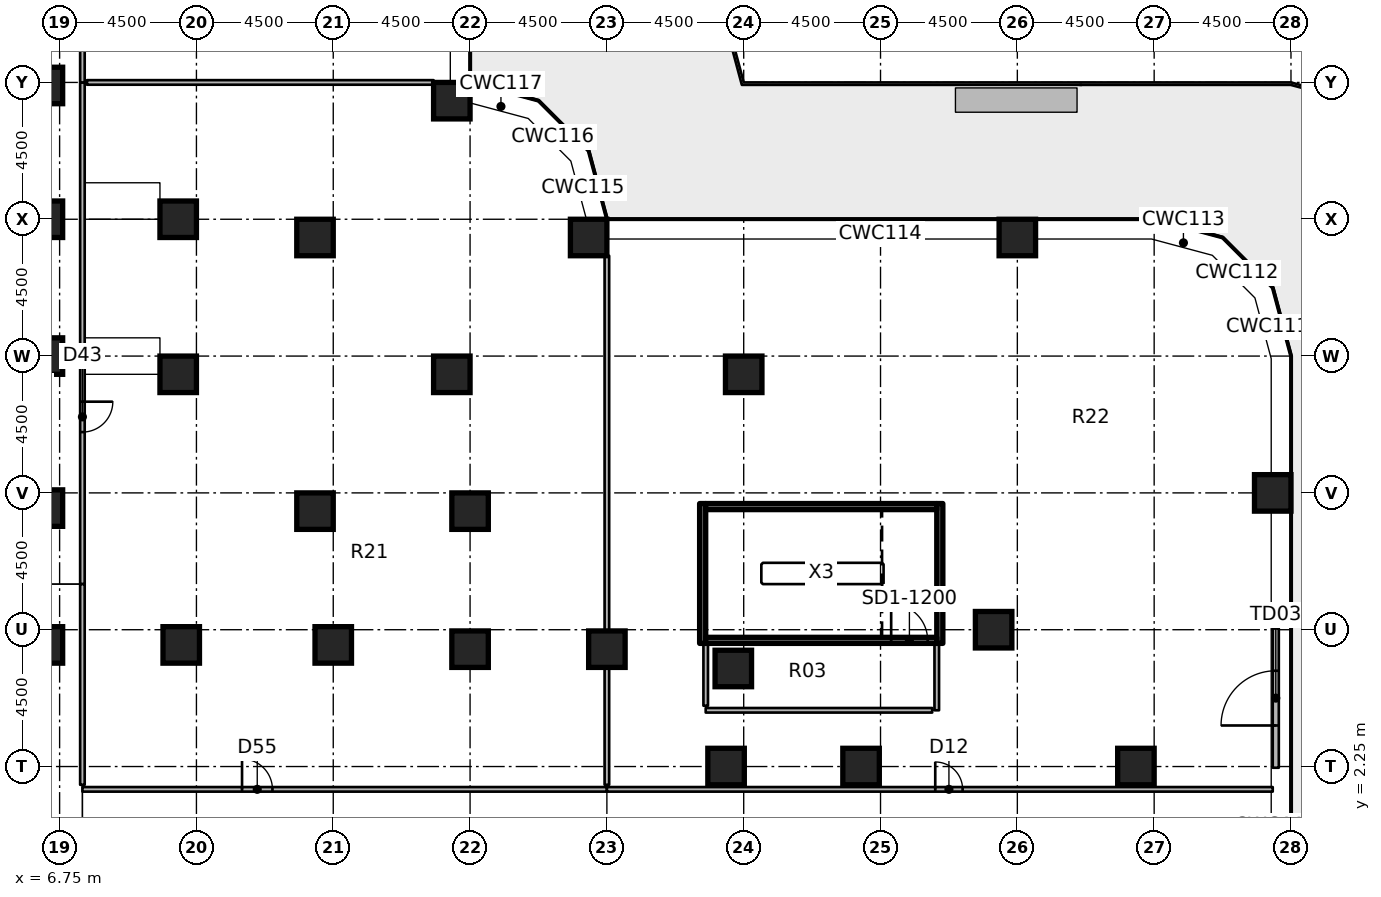
"""IFC4 building model, lengths in metres.
Left out: names, types, materials, properties, quantities, classifications, styles, units other than length and angle.
Written with IfcOpenShell. Run it as: python <this file> out.ifc"""

import sys

from ifc_helpers import new_model, si_unit, direction, frame, frame_2d, origin, origin_2d, place, context, subcontext, project, spatial, rectangle, extrude, element, fill, save


model = new_model("IFC4")
c1 = context("Model", 3, precision=1e-05, world=origin(), true_north=direction((0.0, 1.0)))
c2 = subcontext(c1, "Body", "Model", "MODEL_VIEW")
j1 = project(units=[si_unit("LENGTHUNIT", "METRE"), si_unit("PLANEANGLEUNIT", "RADIAN")], contexts=[c1])
p1 = place(None, origin())
s1 = spatial("IfcSite", under=j1, at=p1, CompositionType="ELEMENT")
p2 = place(p1, origin())
s2 = spatial("IfcBuilding", under=s1, at=p2, CompositionType="ELEMENT")
p3 = place(p2, frame((0.0, 0.0, 12.0)))
s3 = spatial("IfcBuildingStorey", under=s2, at=p3, CompositionType="ELEMENT", Elevation=12.0)
for number, where, z_axis, x_axis in (
    (1, (6.25, 6.25, 0.0), (0.0, 0.0, 1.0), (1.0, 0.0, 0.0)),
    (2, (6.25, 10.75, 0.0), (0.0, 0.0, 1.0), (1.0, 0.0, 0.0)),
    (3, (6.25, 15.75, 0.0), (0.0, 0.0, 1.0), (1.0, 0.0, 0.0)),
    (4, (6.25, 20.25, 0.0), (0.0, 0.0, 1.0), (1.0, 0.0, 0.0)),
    (5, (6.25, 24.65, 0.0), (0.0, 0.0, 1.0), (1.0, 0.0, 0.0)),
    (6, (10.75, 6.25, 0.0), (0.0, 0.0, 1.0), (1.0, 0.0, 0.0)),
    (7, (10.65, 15.15, 0.0), (0.0, 0.0, 1.0), (1.0, 0.0, 0.0)),
    (8, (10.65, 20.25, 0.0), (0.0, 0.0, 1.0), (1.0, 0.0, 0.0)),
    (9, (15.75, 6.25, 0.0), (0.0, 0.0, 1.0), (1.0, 0.0, 0.0)),
    (10, (15.15, 10.65, 0.0), (0.0, 0.0, 1.0), (1.0, 0.0, 0.0)),
    (11, (15.15, 19.65, 0.0), (0.0, 0.0, 1.0), (1.0, 0.0, 0.0)),
    (12, (20.25, 6.11, 0.0), (0.0, 0.0, 1.0), (1.0, 0.0, 0.0)),
    (13, (20.25, 10.65, 0.0), (0.0, 0.0, 1.0), (1.0, 0.0, 0.0)),
    (14, (19.65, 15.15, 0.0), (0.0, 0.0, 1.0), (1.0, 0.0, 0.0)),
    (15, (19.65, 24.15, 0.0), (0.0, 0.0, 1.0), (1.0, 0.0, 0.0)),
    (16, (24.75, 6.11, 0.0), (0.0, 0.0, 1.0), (1.0, 0.0, 0.0)),
    (17, (24.15, 19.65, 0.0), (0.0, 0.0, 1.0), (1.0, 0.0, 0.0)),
    (18, (28.67, 2.25, 0.0), (0.0, 0.0, 1.0), (1.0, 0.0, 0.0)),
    (19, (28.908, 5.475, 0.0), (0.0, 0.0, 1.0), (1.0, 0.0, 0.0)),
    (20, (29.25, 15.15, 0.0), (0.0, 0.0, 1.0), (1.0, 0.0, 0.0)),
    (21, (33.11, 2.25, 0.0), (0.0, 0.0, 1.0), (1.0, 0.0, 0.0)),
    (22, (37.47, 6.75, 0.0), (0.0, 0.0, 1.0), (1.0, 0.0, 0.0)),
    (23, (38.25, 19.65, 0.0), (0.0, 0.0, 1.0), (1.0, 0.0, 0.0)),
    (24, (42.15, 2.25, 0.0), (0.0, 0.0, 1.0), (1.0, 0.0, 0.0)),
    (25, (46.65, 11.25, 0.0), (0.0, 0.0, 1.0), (1.0, 0.0, 0.0)),
):
    element("IfcColumn", number, at=place(p3, frame(where, z_axis=z_axis, x_axis=x_axis)), inside=s3, PredefinedType="COLUMN", context=c2, shape_type="SweptSolid", body=[
        extrude(rectangle(XDim=1.2, YDim=1.2, at=origin_2d()), origin(), (0.0, 0.0, 1.0), 4.55),
    ])
p4 = place(p3, frame((46.75, 2.21, 0.0), z_axis=(0.0, 0.0, 1.0), x_axis=(0.0, 1.0, 0.0)))
e26 = element("IfcWall", 26, at=p4, inside=s3, PredefinedType="SOLIDWALL", context=c2, shape_type="SweptSolid", body=[
    extrude(rectangle(XDim=4.58, YDim=0.2, at=frame_2d((2.29, 0.0))), origin(), (0.0, 0.0, 1.0), 4.55),
])
p5 = place(p4, frame((1.39, 0.0, 0.0)))
e27 = element("IfcOpeningElement", 27, at=p5, cuts=e26, PredefinedType="OPENING", context=c2, shape_type="SweptSolid", body=[
    extrude(rectangle(XDim=1.8, YDim=2.4, at=frame_2d((0.9, 1.2))), frame((0.0, 0.11, 0.0), z_axis=(0.0, -1.0, 0.0), x_axis=(1.0, 0.0, 0.0)), (0.0, 0.0, 1.0), 0.22),
])
for number, where, z_axis, x_axis in (
    (28, (27.9, 6.3, 0.0), (0.0, 0.0, 1.0), (0.0, 1.0, 0.0)),
    (29, (35.7, 6.3, 0.0), (0.0, 0.0, 1.0), (0.0, 1.0, 0.0)),
):
    element("IfcWall", number, at=place(p3, frame(where, z_axis=z_axis, x_axis=x_axis)), inside=s3, PredefinedType="SHEAR", context=c2, shape_type="SweptSolid", body=[
        extrude(rectangle(XDim=4.6, YDim=0.2, at=frame_2d((2.3, 0.0))), origin(), (0.0, 0.0, 1.0), 4.55),
    ])
p6 = place(p3, frame((28.0, 6.4, 0.0), z_axis=(0.0, 0.0, 1.0), x_axis=(1.0, 0.0, 0.0)))
e30 = element("IfcWall", 30, at=p6, inside=s3, PredefinedType="SHEAR", context=c2, shape_type="SweptSolid", body=[
    extrude(rectangle(XDim=7.6, YDim=0.2, at=frame_2d((3.8, 0.0))), origin(), (0.0, 0.0, 1.0), 4.55),
])
p7 = place(p6, frame((6.1, 0.0, 0.0)))
e31 = element("IfcOpeningElement", 31, at=p7, cuts=e30, PredefinedType="OPENING", context=c2, shape_type="SweptSolid", body=[
    extrude(rectangle(XDim=1.2, YDim=2.1, at=frame_2d((0.6, 1.05))), frame((0.0, 0.11, 0.0), z_axis=(0.0, -1.0, 0.0), x_axis=(1.0, 0.0, 0.0)), (0.0, 0.0, 1.0), 0.22),
])
p8 = place(p3, frame((28.0, 10.8, 0.0), z_axis=(0.0, 0.0, 1.0), x_axis=(1.0, 0.0, 0.0)))
e32 = element("IfcWall", 32, at=p8, inside=s3, PredefinedType="SHEAR", context=c2, shape_type="SweptSolid", body=[
    extrude(rectangle(XDim=7.6, YDim=0.2, at=frame_2d((3.8, 0.0))), origin(), (0.0, 0.0, 1.0), 4.55),
])
p9 = place(p3, frame((35.6, 6.3, 0.0), z_axis=(0.0, 0.0, 1.0), x_axis=(0.0, -1.0, 0.0)))
e33 = element("IfcWall", 33, at=p9, inside=s3, PredefinedType="PARTITIONING", context=c2, shape_type="SweptSolid", body=[
    extrude(rectangle(XDim=2.2, YDim=0.15, at=frame_2d((1.1, 0.0))), origin(), (0.0, 0.0, 1.0), 4.55),
])
p10 = place(p3, frame((35.45, 4.1, 0.0), z_axis=(0.0, 0.0, 1.0), x_axis=(-1.0, 0.0, 0.0)))
e34 = element("IfcWall", 34, at=p10, inside=s3, PredefinedType="PARTITIONING", context=c2, shape_type="SweptSolid", body=[
    extrude(rectangle(XDim=7.45, YDim=0.15, at=frame_2d((3.725, 0.0))), origin(), (0.0, 0.0, 1.0), 4.55),
])
p11 = place(p3, frame((28.0, 4.25, 0.0), z_axis=(0.0, 0.0, 1.0), x_axis=(0.0, 1.0, 0.0)))
e35 = element("IfcWall", 35, at=p11, inside=s3, PredefinedType="PARTITIONING", context=c2, shape_type="SweptSolid", body=[
    extrude(rectangle(XDim=2.05, YDim=0.15, at=frame_2d((1.025, 0.0))), origin(), (0.0, 0.0, 1.0), 4.55),
])
p12 = place(p3, frame((7.5, 24.75, 0.0), z_axis=(0.0, 0.0, 1.0), x_axis=(0.0, -1.0, 0.0)))
e36 = element("IfcWall", 36, at=p12, inside=s3, PredefinedType="PARTITIONING", context=c2, shape_type="SweptSolid", body=[
    extrude(rectangle(XDim=16.5, YDim=0.15, at=frame_2d((8.25, 0.0))), origin(), (0.0, 0.0, 1.0), 4.55),
])
p13 = place(p12, frame((10.5, 0.0, 0.0)))
e37 = element("IfcOpeningElement", 37, at=p13, cuts=e36, PredefinedType="OPENING", context=c2, shape_type="SweptSolid", body=[
    extrude(rectangle(XDim=1.0, YDim=2.1, at=frame_2d((0.5, 1.05))), frame((0.0, 0.085, 0.0), z_axis=(0.0, -1.0, 0.0), x_axis=(1.0, 0.0, 0.0)), (0.0, 0.0, 1.0), 0.17),
])
p14 = place(p3, frame((7.5, 30.0, 0.0), z_axis=(0.0, 0.0, 1.0), x_axis=(0.0, -1.0, 0.0)))
e38 = element("IfcWall", 38, at=p14, inside=s3, PredefinedType="PARTITIONING", context=c2, shape_type="SweptSolid", body=[
    extrude(rectangle(XDim=5.25, YDim=0.15, at=frame_2d((2.625, 0.0))), origin(), (0.0, 0.0, 1.0), 4.55),
])
p15 = place(p14, frame((1.75, 0.0, 0.0)))
e39 = element("IfcOpeningElement", 39, at=p15, cuts=e38, PredefinedType="OPENING", context=c2, shape_type="SweptSolid", body=[
    extrude(rectangle(XDim=0.9, YDim=2.1, at=frame_2d((0.45, 1.05))), frame((0.0, 0.085, 0.0), z_axis=(0.0, -1.0, 0.0), x_axis=(1.0, 0.0, 0.0)), (0.0, 0.0, 1.0), 0.17),
])
p16 = place(p3, frame((7.5, 1.5, 0.0), z_axis=(0.0, 0.0, 1.0), x_axis=(1.0, 0.0, 0.0)))
e40 = element("IfcWall", 40, at=p16, inside=s3, PredefinedType="PARTITIONING", context=c2, shape_type="SweptSolid", body=[
    extrude(rectangle(XDim=17.25, YDim=0.15, at=frame_2d((8.625, 0.0))), origin(), (0.0, 0.0, 1.0), 4.55),
])
p17 = place(p16, frame((5.25, 0.0, 0.0)))
e41 = element("IfcOpeningElement", 41, at=p17, cuts=e40, PredefinedType="OPENING", context=c2, shape_type="SweptSolid", body=[
    extrude(rectangle(XDim=1.0, YDim=2.1, at=frame_2d((0.5, 1.05))), frame((0.0, 0.085, 0.0), z_axis=(0.0, -1.0, 0.0), x_axis=(1.0, 0.0, 0.0)), (0.0, 0.0, 1.0), 0.17),
])
p18 = place(p3, frame((24.75, 1.5, 0.0), z_axis=(0.0, 0.0, 1.0), x_axis=(1.0, 0.0, 0.0)))
e42 = element("IfcWall", 42, at=p18, inside=s3, PredefinedType="PARTITIONING", context=c2, shape_type="SweptSolid", body=[
    extrude(rectangle(XDim=21.9, YDim=0.15, at=frame_2d((10.95, 0.0))), origin(), (0.0, 0.0, 1.0), 4.55),
])
p19 = place(p18, frame((10.8, 0.0, 0.0)))
e43 = element("IfcOpeningElement", 43, at=p19, cuts=e42, PredefinedType="OPENING", context=c2, shape_type="SweptSolid", body=[
    extrude(rectangle(XDim=0.9, YDim=2.1, at=frame_2d((0.45, 1.05))), frame((0.0, 0.085, 0.0), z_axis=(0.0, -1.0, 0.0), x_axis=(1.0, 0.0, 0.0)), (0.0, 0.0, 1.0), 0.17),
])
p20 = place(p3, frame((24.75, 19.05, 0.0), z_axis=(0.0, 0.0, 1.0), x_axis=(0.0, -1.0, 0.0)))
e44 = element("IfcWall", 44, at=p20, inside=s3, PredefinedType="PARTITIONING", context=c2, shape_type="SweptSolid", body=[
    extrude(rectangle(XDim=12.34, YDim=0.15, at=frame_2d((6.17, 0.0))), origin(), (0.0, 0.0, 1.0), 4.55),
])
p21 = place(p3, frame((24.75, 5.51, 0.0), z_axis=(0.0, 0.0, 1.0), x_axis=(0.0, -1.0, 0.0)))
e45 = element("IfcWall", 45, at=p21, inside=s3, PredefinedType="PARTITIONING", context=c2, shape_type="SweptSolid", body=[
    extrude(rectangle(XDim=3.86, YDim=0.15, at=frame_2d((1.93, 0.0))), origin(), (0.0, 0.0, 1.0), 4.55),
])
p22 = place(p3, frame((7.65, 24.75, 0.0), z_axis=(0.0, 0.0, 1.0), x_axis=(1.0, 0.0, 0.0)))
e46 = element("IfcWall", 46, at=p22, inside=s3, PredefinedType="PARTITIONING", context=c2, shape_type="SweptSolid", body=[
    extrude(rectangle(XDim=11.4, YDim=0.15, at=frame_2d((5.7, 0.0))), origin(), (0.0, 0.0, 1.0), 4.55),
])
p23 = place(p3, frame((7.5, 1.65, 0.0), z_axis=(0.0, 0.0, 1.0), x_axis=(0.0, 1.0, 0.0)))
e47 = element("IfcWall", 47, at=p23, inside=s3, PredefinedType="PARTITIONING", context=c2, shape_type="SweptSolid", body=[
    extrude(rectangle(XDim=6.6, YDim=0.15, at=frame_2d((3.3, 0.0))), origin(), (0.0, 0.0, 1.0), 4.55),
])
p24 = place(p5, origin())
e48 = element("IfcDoor", 48, at=p24, inside=s3, OperationType="SINGLE_SWING_LEFT", PredefinedType="DOOR", context=c2, shape_type="SweptSolid", body=[
    extrude(rectangle(XDim=1.8, YDim=2.4, at=frame_2d((0.9, 1.2))), frame((0.0, 0.025, 0.0), z_axis=(0.0, -1.0, 0.0), x_axis=(1.0, 0.0, 0.0)), (0.0, 0.0, 1.0), 0.05),
])
fill(e27, e48)
p25 = place(p7, origin())
e49 = element("IfcDoor", 49, at=p25, inside=s3, OperationType="SINGLE_SWING_RIGHT", PredefinedType="DOOR", context=c2, shape_type="SweptSolid", body=[
    extrude(rectangle(XDim=1.2, YDim=2.1, at=frame_2d((0.6, 1.05))), frame((0.0, 0.025, 0.0), z_axis=(0.0, -1.0, 0.0), x_axis=(1.0, 0.0, 0.0)), (0.0, 0.0, 1.0), 0.05),
])
fill(e31, e49)
p26 = place(p13, origin())
e50 = element("IfcDoor", 50, at=p26, inside=s3, OperationType="SINGLE_SWING_LEFT", PredefinedType="DOOR", context=c2, shape_type="SweptSolid", body=[
    extrude(rectangle(XDim=1.0, YDim=2.1, at=frame_2d((0.5, 1.05))), frame((0.0, 0.025, 0.0), z_axis=(0.0, -1.0, 0.0), x_axis=(1.0, 0.0, 0.0)), (0.0, 0.0, 1.0), 0.05),
])
fill(e37, e50)
p27 = place(p17, origin())
e51 = element("IfcDoor", 51, at=p27, inside=s3, OperationType="SINGLE_SWING_LEFT", PredefinedType="DOOR", context=c2, shape_type="SweptSolid", body=[
    extrude(rectangle(XDim=1.0, YDim=2.1, at=frame_2d((0.5, 1.05))), frame((0.0, 0.025, 0.0), z_axis=(0.0, -1.0, 0.0), x_axis=(1.0, 0.0, 0.0)), (0.0, 0.0, 1.0), 0.05),
])
fill(e41, e51)
p28 = place(p19, origin())
e52 = element("IfcDoor", 52, at=p28, inside=s3, OperationType="SINGLE_SWING_LEFT", PredefinedType="DOOR", context=c2, shape_type="SweptSolid", body=[
    extrude(rectangle(XDim=0.9, YDim=2.1, at=frame_2d((0.45, 1.05))), frame((0.0, 0.025, 0.0), z_axis=(0.0, -1.0, 0.0), x_axis=(1.0, 0.0, 0.0)), (0.0, 0.0, 1.0), 0.05),
])
fill(e43, e52)
save(model, sys.argv[1])
